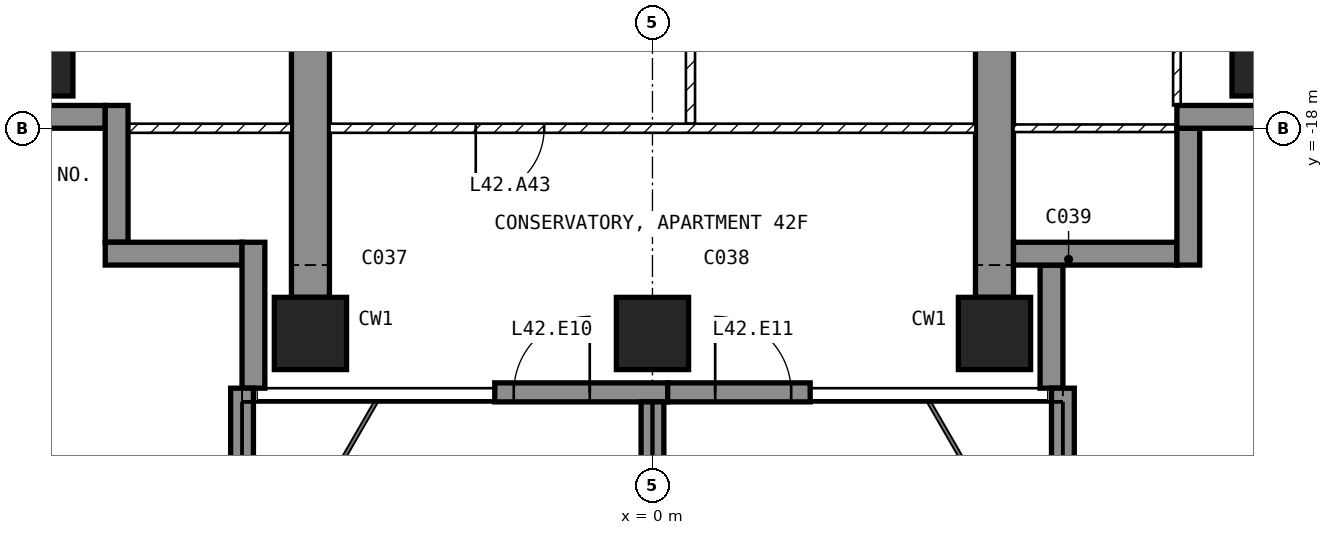
"""IFC4 building model, lengths in metres.
Left out: names, types, materials, properties, quantities, classifications, styles, units other than length and angle.
Written with IfcOpenShell. Run it as: python <this file> out.ifc"""

import sys

from ifc_helpers import new_model, si_unit, direction, frame, frame_2d, origin, origin_2d, place, context, subcontext, project, spatial, polyline, rectangle, outline, extrude, element, fill, save


model = new_model("IFC4")
c1 = context("Model", 3, precision=1e-05, world=origin(), true_north=direction((0.0, 1.0)))
c2 = subcontext(c1, "Body", "Model", "MODEL_VIEW")
j1 = project(units=[si_unit("LENGTHUNIT", "METRE"), si_unit("PLANEANGLEUNIT", "RADIAN")], contexts=[c1])
p1 = place(None, origin())
s1 = spatial("IfcSite", under=j1, at=p1, CompositionType="ELEMENT")
p2 = place(p1, origin())
s2 = spatial("IfcBuilding", under=s1, at=p2, CompositionType="ELEMENT")
p3 = place(p2, frame((0.0, 0.0, 173.6)))
s3 = spatial("IfcBuildingStorey", under=s2, at=p3, CompositionType="ELEMENT", Elevation=173.6)
for number, where, z_axis, x_axis in (
    (1, (-8.1, -17.1, -0.25), (0.0, 0.0, 1.0), (1.0, 0.0, 0.0)),
    (2, (-4.5, -20.7, -0.25), (0.0, 0.0, 1.0), (1.0, 0.0, 0.0)),
    (3, (0.0, -20.7, -0.25), (0.0, 0.0, 1.0), (1.0, 0.0, 0.0)),
    (4, (4.5, -20.7, -0.25), (0.0, 0.0, 1.0), (1.0, 0.0, 0.0)),
    (5, (8.1, -17.1, -0.25), (0.0, 0.0, 1.0), (1.0, 0.0, 0.0)),
):
    element("IfcColumn", number, at=place(p3, frame(where, z_axis=z_axis, x_axis=x_axis)), inside=s3, PredefinedType="COLUMN", context=c2, shape_type="SweptSolid", body=[
        extrude(rectangle(XDim=0.95, YDim=0.95, at=origin_2d()), origin(), (0.0, 0.0, 1.0), 3.5),
    ])
for number, where, z_axis, x_axis in (
    (6, (-4.75, -20.225, -0.25), (1.0, 0.0, 0.0), (0.0, 1.0, 0.0)),
    (7, (4.25, -20.225, -0.25), (1.0, 0.0, 0.0), (0.0, 1.0, 0.0)),
):
    element("IfcWall", number, at=place(p3, frame(where, z_axis=z_axis, x_axis=x_axis)), inside=s3, PredefinedType="SHEAR", context=c2, shape_type="SweptSolid", body=[
        extrude(outline(polyline([(0.0, 0.0), (6.725, 0.0), (6.725, 2.65), (9.125, 2.65), (9.125, 0.0), (11.225, 0.0), (11.225, 3.5), (0.0, 3.5), (0.0, 0.0)])), origin(), (0.0, 0.0, 1.0), 0.5),
    ])
p4 = place(p3, frame((-2.075, -21.475, 0.0), z_axis=(0.0, 0.0, 1.0), x_axis=(1.0, 0.0, 0.0)))
e8 = element("IfcWall", 8, at=p4, inside=s3, PredefinedType="SOLIDWALL", context=c2, shape_type="SweptSolid", body=[
    extrude(rectangle(XDim=2.275, YDim=0.25, at=frame_2d((1.137, 0.0))), origin(), (0.0, 0.0, 1.0), 3.25),
])
p5 = place(p4, frame((0.25, 0.0, 0.0)))
e9 = element("IfcOpeningElement", 9, at=p5, cuts=e8, PredefinedType="OPENING", context=c2, shape_type="SweptSolid", body=[
    extrude(rectangle(XDim=1.0, YDim=2.4, at=frame_2d((0.5, 1.2))), frame((0.0, 0.135, 0.0), z_axis=(0.0, -1.0, 0.0), x_axis=(1.0, 0.0, 0.0)), (0.0, 0.0, 1.0), 0.27),
])
p6 = place(p3, frame((0.2, -21.475, 0.0), z_axis=(0.0, 0.0, 1.0), x_axis=(1.0, 0.0, 0.0)))
e10 = element("IfcWall", 10, at=p6, inside=s3, PredefinedType="SOLIDWALL", context=c2, shape_type="SweptSolid", body=[
    extrude(rectangle(XDim=1.875, YDim=0.25, at=frame_2d((0.938, 0.0))), origin(), (0.0, 0.0, 1.0), 3.25),
])
p7 = place(p6, frame((0.625, 0.0, 0.0)))
e11 = element("IfcOpeningElement", 11, at=p7, cuts=e10, PredefinedType="OPENING", context=c2, shape_type="SweptSolid", body=[
    extrude(rectangle(XDim=1.0, YDim=2.4, at=frame_2d((0.5, 1.2))), frame((0.0, 0.135, 0.0), z_axis=(0.0, -1.0, 0.0), x_axis=(1.0, 0.0, 0.0)), (0.0, 0.0, 1.0), 0.27),
])
p8 = place(p3, frame((5.25, -21.42, 0.0), z_axis=(0.0, 0.0, 1.0), x_axis=(0.0, 1.0, 0.0)))
e12 = element("IfcWall", 12, at=p8, inside=s3, PredefinedType="SOLIDWALL", context=c2, shape_type="SweptSolid", body=[
    extrude(rectangle(XDim=1.62, YDim=0.3, at=frame_2d((0.81, 0.0))), origin(), (0.0, 0.0, 1.0), 3.25),
])
p9 = place(p3, frame((4.75, -19.65, 0.0), z_axis=(0.0, 0.0, 1.0), x_axis=(1.0, 0.0, 0.0)))
e13 = element("IfcWall", 13, at=p9, inside=s3, PredefinedType="SOLIDWALL", context=c2, shape_type="SweptSolid", body=[
    extrude(rectangle(XDim=2.15, YDim=0.3, at=frame_2d((1.075, 0.0))), origin(), (0.0, 0.0, 1.0), 3.25),
])
p10 = place(p3, frame((7.05, -19.8, 0.0), z_axis=(0.0, 0.0, 1.0), x_axis=(0.0, 1.0, 0.0)))
e14 = element("IfcWall", 14, at=p10, inside=s3, PredefinedType="SOLIDWALL", context=c2, shape_type="SweptSolid", body=[
    extrude(rectangle(XDim=1.8, YDim=0.3, at=frame_2d((0.9, 0.0))), origin(), (0.0, 0.0, 1.0), 3.25),
])
p11 = place(p3, frame((6.9, -17.85, 0.0), z_axis=(0.0, 0.0, 1.0), x_axis=(1.0, 0.0, 0.0)))
e15 = element("IfcWall", 15, at=p11, inside=s3, PredefinedType="SOLIDWALL", context=c2, shape_type="SweptSolid", body=[
    extrude(rectangle(XDim=1.85, YDim=0.3, at=frame_2d((0.925, 0.0))), origin(), (0.0, 0.0, 1.0), 3.25),
])
p12 = place(p3, frame((-8.75, -17.85, 0.0), z_axis=(0.0, 0.0, 1.0), x_axis=(1.0, 0.0, 0.0)))
e16 = element("IfcWall", 16, at=p12, inside=s3, PredefinedType="SOLIDWALL", context=c2, shape_type="SweptSolid", body=[
    extrude(rectangle(XDim=1.55, YDim=0.3, at=frame_2d((0.775, 0.0))), origin(), (0.0, 0.0, 1.0), 3.25),
])
for number, where, z_axis, x_axis in (
    (17, (-7.05, -17.7, 0.0), (0.0, 0.0, 1.0), (0.0, -1.0, 0.0)),
    (18, (-7.2, -19.65, 0.0), (0.0, 0.0, 1.0), (1.0, 0.0, 0.0)),
):
    element("IfcWall", number, at=place(p3, frame(where, z_axis=z_axis, x_axis=x_axis)), inside=s3, PredefinedType="SOLIDWALL", context=c2, shape_type="SweptSolid", body=[
        extrude(rectangle(XDim=1.8, YDim=0.3, at=frame_2d((0.9, 0.0))), origin(), (0.0, 0.0, 1.0), 3.25),
    ])
p13 = place(p3, frame((-5.25, -19.5, 0.0), z_axis=(0.0, 0.0, 1.0), x_axis=(0.0, -1.0, 0.0)))
e19 = element("IfcWall", 19, at=p13, inside=s3, PredefinedType="SOLIDWALL", context=c2, shape_type="SweptSolid", body=[
    extrude(rectangle(XDim=1.92, YDim=0.3, at=frame_2d((0.96, 0.0))), origin(), (0.0, 0.0, 1.0), 3.25),
])
p14 = place(p3, frame((-5.4, -21.42, 0.0), z_axis=(0.0, 0.0, 1.0), x_axis=(0.0, -1.0, 0.0)))
e20 = element("IfcWall", 20, at=p14, inside=s3, PredefinedType="SOLIDWALL", context=c2, shape_type="SweptSolid", body=[
    extrude(rectangle(XDim=2.88, YDim=0.3, at=frame_2d((1.44, 0.0))), origin(), (0.0, 0.0, 1.0), 3.25),
])
p15 = place(p3, frame((0.0, -21.6, 0.0), z_axis=(0.0, 0.0, 1.0), x_axis=(0.0, -1.0, 0.0)))
e21 = element("IfcWall", 21, at=p15, inside=s3, PredefinedType="SOLIDWALL", context=c2, shape_type="SweptSolid", body=[
    extrude(rectangle(XDim=2.7, YDim=0.3, at=frame_2d((1.35, 0.0))), origin(), (0.0, 0.0, 1.0), 3.25),
])
p16 = place(p3, frame((5.4, -21.42, 0.0), z_axis=(0.0, 0.0, 1.0), x_axis=(0.0, -1.0, 0.0)))
e22 = element("IfcWall", 22, at=p16, inside=s3, PredefinedType="SOLIDWALL", context=c2, shape_type="SweptSolid", body=[
    extrude(rectangle(XDim=2.88, YDim=0.3, at=frame_2d((1.44, 0.0))), origin(), (0.0, 0.0, 1.0), 3.25),
])
p17 = place(p3, frame((0.5, -15.06, 0.0), z_axis=(0.0, 0.0, 1.0), x_axis=(0.0, -1.0, 0.0)))
e23 = element("IfcWall", 23, at=p17, inside=s3, PredefinedType="PARTITIONING", context=c2, shape_type="SweptSolid", body=[
    extrude(rectangle(XDim=2.88, YDim=0.12, at=frame_2d((1.44, 0.0))), origin(), (0.0, 0.0, 1.0), 3.25),
])
p18 = place(p3, frame((4.25, -18.0, 0.0), z_axis=(0.0, 0.0, 1.0), x_axis=(-1.0, 0.0, 0.0)))
e24 = element("IfcWall", 24, at=p18, inside=s3, PredefinedType="PARTITIONING", context=c2, shape_type="SweptSolid", body=[
    extrude(rectangle(XDim=8.5, YDim=0.12, at=frame_2d((4.25, 0.0))), origin(), (0.0, 0.0, 1.0), 3.25),
])
p19 = place(p18, frame((5.675, 0.0, 0.0)))
e25 = element("IfcOpeningElement", 25, at=p19, cuts=e24, PredefinedType="OPENING", context=c2, shape_type="SweptSolid", body=[
    extrude(rectangle(XDim=0.9, YDim=2.1, at=frame_2d((0.45, 1.05))), frame((0.0, 0.07, 0.0), z_axis=(0.0, -1.0, 0.0), x_axis=(1.0, 0.0, 0.0)), (0.0, 0.0, 1.0), 0.14),
])
p20 = place(p3, frame((6.9, -17.7, 0.0), z_axis=(0.0, 0.0, 1.0), x_axis=(0.0, 1.0, 0.0)))
e26 = element("IfcWall", 26, at=p20, inside=s3, PredefinedType="PARTITIONING", context=c2, shape_type="SweptSolid", body=[
    extrude(rectangle(XDim=3.25, YDim=0.1, at=frame_2d((1.625, 0.0))), origin(), (0.0, 0.0, 1.0), 3.25),
])
p21 = place(p20, frame((2.05, 0.0, 0.0)))
e27 = element("IfcOpeningElement", 27, at=p21, cuts=e26, PredefinedType="OPENING", context=c2, shape_type="SweptSolid", body=[
    extrude(rectangle(XDim=0.85, YDim=2.1, at=frame_2d((0.425, 1.05))), frame((0.0, 0.06, 0.0), z_axis=(0.0, -1.0, 0.0), x_axis=(1.0, 0.0, 0.0)), (0.0, 0.0, 1.0), 0.12),
])
p22 = place(p3, frame((7.12, -18.0, 0.0), z_axis=(0.0, 0.0, 1.0), x_axis=(-1.0, 0.0, 0.0)))
e28 = element("IfcWall", 28, at=p22, inside=s3, PredefinedType="PARTITIONING", context=c2, shape_type="SweptSolid", body=[
    extrude(rectangle(XDim=2.37, YDim=0.1, at=frame_2d((1.185, 0.0))), origin(), (0.0, 0.0, 1.0), 3.25),
])
p23 = place(p3, frame((-4.75, -18.0, 0.0), z_axis=(0.0, 0.0, 1.0), x_axis=(-1.0, 0.0, 0.0)))
e29 = element("IfcWall", 29, at=p23, inside=s3, PredefinedType="PARTITIONING", context=c2, shape_type="SweptSolid", body=[
    extrude(rectangle(XDim=2.37, YDim=0.12, at=frame_2d((1.185, 0.0))), origin(), (0.0, 0.0, 1.0), 3.25),
])
p24 = place(p5, origin())
e30 = element("IfcDoor", 30, at=p24, inside=s3, OperationType="SINGLE_SWING_RIGHT", PredefinedType="DOOR", context=c2, shape_type="SweptSolid", body=[
    extrude(rectangle(XDim=1.0, YDim=2.4, at=frame_2d((0.5, 1.2))), frame((0.0, 0.025, 0.0), z_axis=(0.0, -1.0, 0.0), x_axis=(1.0, 0.0, 0.0)), (0.0, 0.0, 1.0), 0.05),
])
fill(e9, e30)
p25 = place(p7, origin())
e31 = element("IfcDoor", 31, at=p25, inside=s3, OperationType="SINGLE_SWING_LEFT", PredefinedType="DOOR", context=c2, shape_type="SweptSolid", body=[
    extrude(rectangle(XDim=1.0, YDim=2.4, at=frame_2d((0.5, 1.2))), frame((0.0, 0.025, 0.0), z_axis=(0.0, -1.0, 0.0), x_axis=(1.0, 0.0, 0.0)), (0.0, 0.0, 1.0), 0.05),
])
fill(e11, e31)
p26 = place(p19, origin())
e32 = element("IfcDoor", 32, at=p26, inside=s3, OperationType="SINGLE_SWING_RIGHT", PredefinedType="DOOR", context=c2, shape_type="SweptSolid", body=[
    extrude(rectangle(XDim=0.9, YDim=2.1, at=frame_2d((0.45, 1.05))), frame((0.0, 0.025, 0.0), z_axis=(0.0, -1.0, 0.0), x_axis=(1.0, 0.0, 0.0)), (0.0, 0.0, 1.0), 0.05),
])
fill(e25, e32)
save(model, sys.argv[1])
